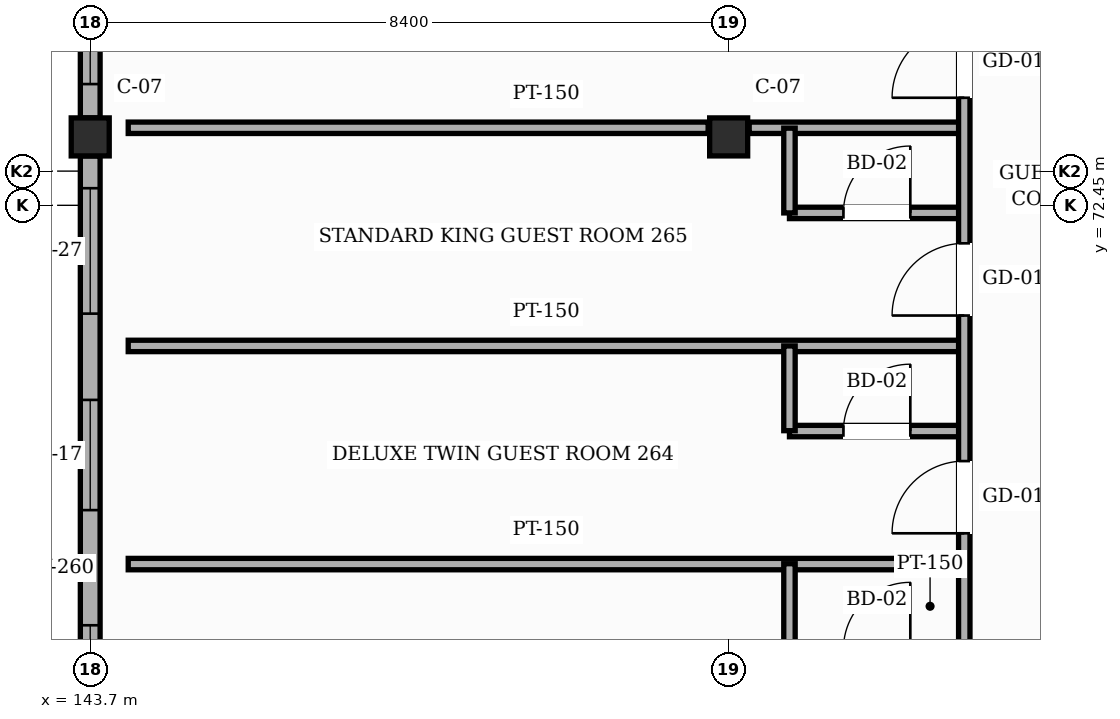
"""IFC4 building model, lengths in metres.
Left out: names, types, materials, properties, quantities, classifications, styles, units other than length and angle.
Written with IfcOpenShell. Run it as: python <this file> out.ifc"""

import sys

from ifc_helpers import new_model, si_unit, direction, frame, frame_2d, origin, origin_2d, place, context, subcontext, project, spatial, rectangle, hollow_rectangle, extrude, element, fill, save


model = new_model("IFC4")
c1 = context("Model", 3, precision=1e-05, world=origin(), true_north=direction((0.0, 1.0)))
c2 = subcontext(c1, "Body", "Model", "MODEL_VIEW")
j1 = project(units=[si_unit("LENGTHUNIT", "METRE"), si_unit("PLANEANGLEUNIT", "RADIAN")], contexts=[c1])
p1 = place(None, origin())
s1 = spatial("IfcSite", under=j1, at=p1, CompositionType="ELEMENT")
p2 = place(p1, origin())
s2 = spatial("IfcBuilding", under=s1, at=p2, CompositionType="ELEMENT")
p3 = place(p2, frame((0.0, 0.0, 39.0)))
s3 = spatial("IfcBuildingStorey", under=s2, at=p3, CompositionType="ELEMENT", Elevation=39.0)
for number, where, z_axis, x_axis in (
    (1, (143.7, 73.35, 0.0), (0.0, 0.0, 1.0), (1.0, 0.0, 0.0)),
    (2, (152.1, 73.35, 0.0), (0.0, 0.0, 1.0), (1.0, 0.0, 0.0)),
):
    element("IfcColumn", number, at=place(p3, frame(where, z_axis=z_axis, x_axis=x_axis)), inside=s3, PredefinedType="COLUMN", context=c2, shape_type="SweptSolid", body=[
        extrude(hollow_rectangle(XDim=0.5, YDim=0.5, WallThickness=0.022, InnerFilletRadius=0.022, OuterFilletRadius=0.044, at=origin_2d()), origin(), (0.0, 0.0, 1.0), 3.6),
    ])
p4 = place(p3, frame((143.7, 64.7, 0.0), z_axis=(0.0, 0.0, 1.0), x_axis=(0.0, 1.0, 0.0)))
e3 = element("IfcWall", 3, at=p4, inside=s3, PredefinedType="SOLIDWALL", context=c2, shape_type="SweptSolid", body=[
    extrude(rectangle(XDim=8.4, YDim=0.26, at=frame_2d((4.2, 0.0))), origin(), (0.0, 0.0, 1.0), 2.655),
])
p5 = place(p4, frame((0.975, 0.0, 0.85)))
e4 = element("IfcOpeningElement", 4, at=p5, cuts=e3, PredefinedType="OPENING", context=c2, shape_type="SweptSolid", body=[
    extrude(rectangle(XDim=1.25, YDim=1.5, at=frame_2d((0.625, 0.75))), frame((0.0, 0.14, 0.0), z_axis=(0.0, -1.0, 0.0), x_axis=(1.0, 0.0, 0.0)), (0.0, 0.0, 1.0), 0.28),
])
p6 = place(p4, frame((3.74, 0.0, 0.85)))
e5 = element("IfcOpeningElement", 5, at=p6, cuts=e3, PredefinedType="OPENING", context=c2, shape_type="SweptSolid", body=[
    extrude(rectangle(XDim=1.45, YDim=1.5, at=frame_2d((0.725, 0.75))), frame((0.0, 0.14, 0.0), z_axis=(0.0, -1.0, 0.0), x_axis=(1.0, 0.0, 0.0)), (0.0, 0.0, 1.0), 0.28),
])
p7 = place(p4, frame((6.325, 0.0, 0.85)))
e6 = element("IfcOpeningElement", 6, at=p7, cuts=e3, PredefinedType="OPENING", context=c2, shape_type="SweptSolid", body=[
    extrude(rectangle(XDim=1.65, YDim=1.5, at=frame_2d((0.825, 0.75))), frame((0.0, 0.14, 0.0), z_axis=(0.0, -1.0, 0.0), x_axis=(1.0, 0.0, 0.0)), (0.0, 0.0, 1.0), 0.28),
])
p8 = place(p3, frame((143.7, 73.6, 0.0), z_axis=(0.0, 0.0, 1.0), x_axis=(0.0, 1.0, 0.0)))
e7 = element("IfcWall", 7, at=p8, inside=s3, PredefinedType="SOLIDWALL", context=c2, shape_type="SweptSolid", body=[
    extrude(rectangle(XDim=7.05, YDim=0.26, at=frame_2d((3.525, 0.0))), origin(), (0.0, 0.0, 1.0), 2.805),
])
p9 = place(p8, frame((0.445, 0.0, 0.85)))
e8 = element("IfcOpeningElement", 8, at=p9, cuts=e7, PredefinedType="OPENING", context=c2, shape_type="SweptSolid", body=[
    extrude(rectangle(XDim=1.85, YDim=1.5, at=frame_2d((0.925, 0.75))), frame((0.0, 0.14, 0.0), z_axis=(0.0, -1.0, 0.0), x_axis=(1.0, 0.0, 0.0)), (0.0, 0.0, 1.0), 0.28),
])
p10 = place(p8, frame((3.12, 0.0, 0.85)))
e9 = element("IfcOpeningElement", 9, at=p10, cuts=e7, PredefinedType="OPENING", context=c2, shape_type="SweptSolid", body=[
    extrude(rectangle(XDim=2.1, YDim=1.5, at=frame_2d((1.05, 0.75))), frame((0.0, 0.14, 0.0), z_axis=(0.0, -1.0, 0.0), x_axis=(1.0, 0.0, 0.0)), (0.0, 0.0, 1.0), 0.28),
])
p11 = place(p8, frame((5.75, 0.0, 0.85)))
e10 = element("IfcOpeningElement", 10, at=p11, cuts=e7, PredefinedType="OPENING", context=c2, shape_type="SweptSolid", body=[
    extrude(rectangle(XDim=1.15, YDim=1.65, at=frame_2d((0.575, 0.825))), frame((0.0, 0.14, 0.0), z_axis=(0.0, -1.0, 0.0), x_axis=(1.0, 0.0, 0.0)), (0.0, 0.0, 1.0), 0.28),
])
p12 = place(p3, frame((144.2, 67.73, 0.0), z_axis=(0.0, 0.0, 1.0), x_axis=(1.0, 0.0, 0.0)))
e11 = element("IfcWall", 11, at=p12, inside=s3, PredefinedType="PARTITIONING", context=c2, shape_type="SweptSolid", body=[
    extrude(rectangle(XDim=11.0, YDim=0.15, at=frame_2d((5.5, 0.0))), origin(), (0.0, 0.0, 1.0), 3.365),
])
p13 = place(p3, frame((152.9, 69.48, 0.0), z_axis=(0.0, 0.0, 1.0), x_axis=(1.0, 0.0, 0.0)))
e12 = element("IfcWall", 12, at=p13, inside=s3, PredefinedType="PARTITIONING", context=c2, shape_type="SweptSolid", body=[
    extrude(rectangle(XDim=2.3, YDim=0.15, at=frame_2d((1.15, 0.0))), origin(), (0.0, 0.0, 1.0), 3.365),
])
p14 = place(p13, frame((0.71, 0.0, 0.0)))
e13 = element("IfcOpeningElement", 13, at=p14, cuts=e12, PredefinedType="OPENING", context=c2, shape_type="SweptSolid", body=[
    extrude(rectangle(XDim=0.88, YDim=2.12, at=frame_2d((0.44, 1.06))), frame((0.0, 0.085, 0.0), z_axis=(0.0, -1.0, 0.0), x_axis=(1.0, 0.0, 0.0)), (0.0, 0.0, 1.0), 0.17),
])
p15 = place(p3, frame((144.2, 70.6, 0.0), z_axis=(0.0, 0.0, 1.0), x_axis=(1.0, 0.0, 0.0)))
e14 = element("IfcWall", 14, at=p15, inside=s3, PredefinedType="PARTITIONING", context=c2, shape_type="SweptSolid", body=[
    extrude(rectangle(XDim=11.0, YDim=0.15, at=frame_2d((5.5, 0.0))), origin(), (0.0, 0.0, 1.0), 3.365),
])
p16 = place(p3, frame((152.9, 72.35, 0.0), z_axis=(0.0, 0.0, 1.0), x_axis=(1.0, 0.0, 0.0)))
e15 = element("IfcWall", 15, at=p16, inside=s3, PredefinedType="PARTITIONING", context=c2, shape_type="SweptSolid", body=[
    extrude(rectangle(XDim=2.3, YDim=0.15, at=frame_2d((1.15, 0.0))), origin(), (0.0, 0.0, 1.0), 3.365),
])
p17 = place(p16, frame((0.71, 0.0, 0.0)))
e16 = element("IfcOpeningElement", 16, at=p17, cuts=e15, PredefinedType="OPENING", context=c2, shape_type="SweptSolid", body=[
    extrude(rectangle(XDim=0.88, YDim=2.12, at=frame_2d((0.44, 1.06))), frame((0.0, 0.085, 0.0), z_axis=(0.0, -1.0, 0.0), x_axis=(1.0, 0.0, 0.0)), (0.0, 0.0, 1.0), 0.17),
])
p18 = place(p3, frame((144.2, 73.47, 0.0), z_axis=(0.0, 0.0, 1.0), x_axis=(1.0, 0.0, 0.0)))
e17 = element("IfcWall", 17, at=p18, inside=s3, PredefinedType="PARTITIONING", context=c2, shape_type="SweptSolid", body=[
    extrude(rectangle(XDim=7.63, YDim=0.15, at=frame_2d((3.815, 0.0))), origin(), (0.0, 0.0, 1.0), 2.755),
])
p19 = place(p3, frame((152.37, 73.47, 0.0), z_axis=(0.0, 0.0, 1.0), x_axis=(1.0, 0.0, 0.0)))
e18 = element("IfcWall", 18, at=p19, inside=s3, PredefinedType="PARTITIONING", context=c2, shape_type="SweptSolid", body=[
    extrude(rectangle(XDim=2.83, YDim=0.15, at=frame_2d((1.415, 0.0))), origin(), (0.0, 0.0, 1.0), 3.365),
])
p20 = place(p3, frame((152.9, 66.615, 0.0), z_axis=(0.0, 0.0, 1.0), x_axis=(0.0, 1.0, 0.0)))
e19 = element("IfcWall", 19, at=p20, inside=s3, PredefinedType="PARTITIONING", context=c2, shape_type="SweptSolid", body=[
    extrude(rectangle(XDim=1.12, YDim=0.15, at=frame_2d((0.56, 0.0))), origin(), (0.0, 0.0, 1.0), 3.365),
])
for number, where, z_axis, x_axis in (
    (20, (152.9, 69.485, 0.0), (0.0, 0.0, 1.0), (0.0, 1.0, 0.0)),
    (21, (152.9, 72.35, 0.0), (0.0, 0.0, 1.0), (0.0, 1.0, 0.0)),
):
    element("IfcWall", number, at=place(p3, frame(where, z_axis=z_axis, x_axis=x_axis)), inside=s3, PredefinedType="PARTITIONING", context=c2, shape_type="SweptSolid", body=[
        extrude(rectangle(XDim=1.115, YDim=0.15, at=frame_2d((0.558, 0.0))), origin(), (0.0, 0.0, 1.0), 3.365),
    ])
p21 = place(p3, frame((155.2, 62.0, 0.0), z_axis=(0.0, 0.0, 1.0), x_axis=(0.0, 1.0, 0.0)))
e22 = element("IfcWall", 22, at=p21, inside=s3, PredefinedType="PARTITIONING", context=c2, shape_type="SweptSolid", body=[
    extrude(rectangle(XDim=34.4, YDim=0.15, at=frame_2d((17.2, 0.0))), origin(), (0.0, 0.0, 1.0), 3.365),
])
p22 = place(p21, frame((0.325, 0.0, 0.0)))
e23 = element("IfcOpeningElement", 23, at=p22, cuts=e22, PredefinedType="OPENING", context=c2, shape_type="SweptSolid", body=[
    extrude(rectangle(XDim=1.1, YDim=2.2, at=frame_2d((0.55, 1.1))), frame((0.0, 0.085, 0.0), z_axis=(0.0, -1.0, 0.0), x_axis=(1.0, 0.0, 0.0)), (0.0, 0.0, 1.0), 0.17),
])
p23 = place(p21, frame((3.265, 0.0, 0.0)))
e24 = element("IfcOpeningElement", 24, at=p23, cuts=e22, PredefinedType="OPENING", context=c2, shape_type="SweptSolid", body=[
    extrude(rectangle(XDim=0.95, YDim=2.15, at=frame_2d((0.475, 1.075))), frame((0.0, 0.085, 0.0), z_axis=(0.0, -1.0, 0.0), x_axis=(1.0, 0.0, 0.0)), (0.0, 0.0, 1.0), 0.17),
])
p24 = place(p21, frame((6.135, 0.0, 0.0)))
e25 = element("IfcOpeningElement", 25, at=p24, cuts=e22, PredefinedType="OPENING", context=c2, shape_type="SweptSolid", body=[
    extrude(rectangle(XDim=0.95, YDim=2.15, at=frame_2d((0.475, 1.075))), frame((0.0, 0.085, 0.0), z_axis=(0.0, -1.0, 0.0), x_axis=(1.0, 0.0, 0.0)), (0.0, 0.0, 1.0), 0.17),
])
p25 = place(p21, frame((9.0, 0.0, 0.0)))
e26 = element("IfcOpeningElement", 26, at=p25, cuts=e22, PredefinedType="OPENING", context=c2, shape_type="SweptSolid", body=[
    extrude(rectangle(XDim=0.95, YDim=2.15, at=frame_2d((0.475, 1.075))), frame((0.0, 0.085, 0.0), z_axis=(0.0, -1.0, 0.0), x_axis=(1.0, 0.0, 0.0)), (0.0, 0.0, 1.0), 0.17),
])
p26 = place(p21, frame((11.865, 0.0, 0.0)))
e27 = element("IfcOpeningElement", 27, at=p26, cuts=e22, PredefinedType="OPENING", context=c2, shape_type="SweptSolid", body=[
    extrude(rectangle(XDim=0.95, YDim=2.15, at=frame_2d((0.475, 1.075))), frame((0.0, 0.085, 0.0), z_axis=(0.0, -1.0, 0.0), x_axis=(1.0, 0.0, 0.0)), (0.0, 0.0, 1.0), 0.17),
])
p27 = place(p21, frame((14.735, 0.0, 0.0)))
e28 = element("IfcOpeningElement", 28, at=p27, cuts=e22, PredefinedType="OPENING", context=c2, shape_type="SweptSolid", body=[
    extrude(rectangle(XDim=0.95, YDim=2.15, at=frame_2d((0.475, 1.075))), frame((0.0, 0.085, 0.0), z_axis=(0.0, -1.0, 0.0), x_axis=(1.0, 0.0, 0.0)), (0.0, 0.0, 1.0), 0.17),
])
p28 = place(p21, frame((17.6, 0.0, 0.0)))
e29 = element("IfcOpeningElement", 29, at=p28, cuts=e22, PredefinedType="OPENING", context=c2, shape_type="SweptSolid", body=[
    extrude(rectangle(XDim=0.95, YDim=2.15, at=frame_2d((0.475, 1.075))), frame((0.0, 0.085, 0.0), z_axis=(0.0, -1.0, 0.0), x_axis=(1.0, 0.0, 0.0)), (0.0, 0.0, 1.0), 0.17),
])
p29 = place(p21, frame((20.465, 0.0, 0.0)))
e30 = element("IfcOpeningElement", 30, at=p29, cuts=e22, PredefinedType="OPENING", context=c2, shape_type="SweptSolid", body=[
    extrude(rectangle(XDim=0.95, YDim=2.15, at=frame_2d((0.475, 1.075))), frame((0.0, 0.085, 0.0), z_axis=(0.0, -1.0, 0.0), x_axis=(1.0, 0.0, 0.0)), (0.0, 0.0, 1.0), 0.17),
])
p30 = place(p21, frame((23.335, 0.0, 0.0)))
e31 = element("IfcOpeningElement", 31, at=p30, cuts=e22, PredefinedType="OPENING", context=c2, shape_type="SweptSolid", body=[
    extrude(rectangle(XDim=0.95, YDim=2.15, at=frame_2d((0.475, 1.075))), frame((0.0, 0.085, 0.0), z_axis=(0.0, -1.0, 0.0), x_axis=(1.0, 0.0, 0.0)), (0.0, 0.0, 1.0), 0.17),
])
p31 = place(p21, frame((26.2, 0.0, 0.0)))
e32 = element("IfcOpeningElement", 32, at=p31, cuts=e22, PredefinedType="OPENING", context=c2, shape_type="SweptSolid", body=[
    extrude(rectangle(XDim=0.95, YDim=2.15, at=frame_2d((0.475, 1.075))), frame((0.0, 0.085, 0.0), z_axis=(0.0, -1.0, 0.0), x_axis=(1.0, 0.0, 0.0)), (0.0, 0.0, 1.0), 0.17),
])
p32 = place(p21, frame((29.065, 0.0, 0.0)))
e33 = element("IfcOpeningElement", 33, at=p32, cuts=e22, PredefinedType="OPENING", context=c2, shape_type="SweptSolid", body=[
    extrude(rectangle(XDim=0.95, YDim=2.15, at=frame_2d((0.475, 1.075))), frame((0.0, 0.085, 0.0), z_axis=(0.0, -1.0, 0.0), x_axis=(1.0, 0.0, 0.0)), (0.0, 0.0, 1.0), 0.17),
])
p33 = place(p21, frame((31.935, 0.0, 0.0)))
e34 = element("IfcOpeningElement", 34, at=p33, cuts=e22, PredefinedType="OPENING", context=c2, shape_type="SweptSolid", body=[
    extrude(rectangle(XDim=0.95, YDim=2.15, at=frame_2d((0.475, 1.075))), frame((0.0, 0.085, 0.0), z_axis=(0.0, -1.0, 0.0), x_axis=(1.0, 0.0, 0.0)), (0.0, 0.0, 1.0), 0.17),
])
p34 = place(p5, origin())
e35 = element("IfcWindow", 35, at=p34, inside=s3, PartitioningType="SINGLE_PANEL", PredefinedType="WINDOW", context=c2, shape_type="SweptSolid", body=[
    extrude(rectangle(XDim=1.25, YDim=1.5, at=frame_2d((0.625, 0.75))), frame((0.0, 0.03, 0.0), z_axis=(0.0, -1.0, 0.0), x_axis=(1.0, 0.0, 0.0)), (0.0, 0.0, 1.0), 0.06),
])
fill(e4, e35)
p35 = place(p6, origin())
e36 = element("IfcWindow", 36, at=p35, inside=s3, PartitioningType="SINGLE_PANEL", PredefinedType="WINDOW", context=c2, shape_type="SweptSolid", body=[
    extrude(rectangle(XDim=1.45, YDim=1.5, at=frame_2d((0.725, 0.75))), frame((0.0, 0.03, 0.0), z_axis=(0.0, -1.0, 0.0), x_axis=(1.0, 0.0, 0.0)), (0.0, 0.0, 1.0), 0.06),
])
fill(e5, e36)
p36 = place(p7, origin())
e37 = element("IfcWindow", 37, at=p36, inside=s3, PartitioningType="SINGLE_PANEL", PredefinedType="WINDOW", context=c2, shape_type="SweptSolid", body=[
    extrude(rectangle(XDim=1.65, YDim=1.5, at=frame_2d((0.825, 0.75))), frame((0.0, 0.03, 0.0), z_axis=(0.0, -1.0, 0.0), x_axis=(1.0, 0.0, 0.0)), (0.0, 0.0, 1.0), 0.06),
])
fill(e6, e37)
p37 = place(p9, origin())
e38 = element("IfcWindow", 38, at=p37, inside=s3, PartitioningType="SINGLE_PANEL", PredefinedType="WINDOW", context=c2, shape_type="SweptSolid", body=[
    extrude(rectangle(XDim=1.85, YDim=1.5, at=frame_2d((0.925, 0.75))), frame((0.0, 0.03, 0.0), z_axis=(0.0, -1.0, 0.0), x_axis=(1.0, 0.0, 0.0)), (0.0, 0.0, 1.0), 0.06),
])
fill(e8, e38)
p38 = place(p24, origin())
e39 = element("IfcDoor", 39, at=p38, inside=s3, OperationType="SINGLE_SWING_LEFT", PredefinedType="DOOR", context=c2, shape_type="SweptSolid", body=[
    extrude(rectangle(XDim=0.95, YDim=2.15, at=frame_2d((0.475, 1.075))), frame((0.0, 0.025, 0.0), z_axis=(0.0, -1.0, 0.0), x_axis=(1.0, 0.0, 0.0)), (0.0, 0.0, 1.0), 0.05),
])
fill(e25, e39)
p39 = place(p14, origin())
e40 = element("IfcDoor", 40, at=p39, inside=s3, OperationType="SINGLE_SWING_RIGHT", PredefinedType="DOOR", context=c2, shape_type="SweptSolid", body=[
    extrude(rectangle(XDim=0.88, YDim=2.12, at=frame_2d((0.44, 1.06))), frame((0.0, 0.025, 0.0), z_axis=(0.0, -1.0, 0.0), x_axis=(1.0, 0.0, 0.0)), (0.0, 0.0, 1.0), 0.05),
])
fill(e13, e40)
p40 = place(p25, origin())
e41 = element("IfcDoor", 41, at=p40, inside=s3, OperationType="SINGLE_SWING_LEFT", PredefinedType="DOOR", context=c2, shape_type="SweptSolid", body=[
    extrude(rectangle(XDim=0.95, YDim=2.15, at=frame_2d((0.475, 1.075))), frame((0.0, 0.025, 0.0), z_axis=(0.0, -1.0, 0.0), x_axis=(1.0, 0.0, 0.0)), (0.0, 0.0, 1.0), 0.05),
])
fill(e26, e41)
p41 = place(p17, origin())
e42 = element("IfcDoor", 42, at=p41, inside=s3, OperationType="SINGLE_SWING_RIGHT", PredefinedType="DOOR", context=c2, shape_type="SweptSolid", body=[
    extrude(rectangle(XDim=0.88, YDim=2.12, at=frame_2d((0.44, 1.06))), frame((0.0, 0.025, 0.0), z_axis=(0.0, -1.0, 0.0), x_axis=(1.0, 0.0, 0.0)), (0.0, 0.0, 1.0), 0.05),
])
fill(e16, e42)
p42 = place(p26, origin())
e43 = element("IfcDoor", 43, at=p42, inside=s3, OperationType="SINGLE_SWING_LEFT", PredefinedType="DOOR", context=c2, shape_type="SweptSolid", body=[
    extrude(rectangle(XDim=0.95, YDim=2.15, at=frame_2d((0.475, 1.075))), frame((0.0, 0.025, 0.0), z_axis=(0.0, -1.0, 0.0), x_axis=(1.0, 0.0, 0.0)), (0.0, 0.0, 1.0), 0.05),
])
fill(e27, e43)
save(model, sys.argv[1])
